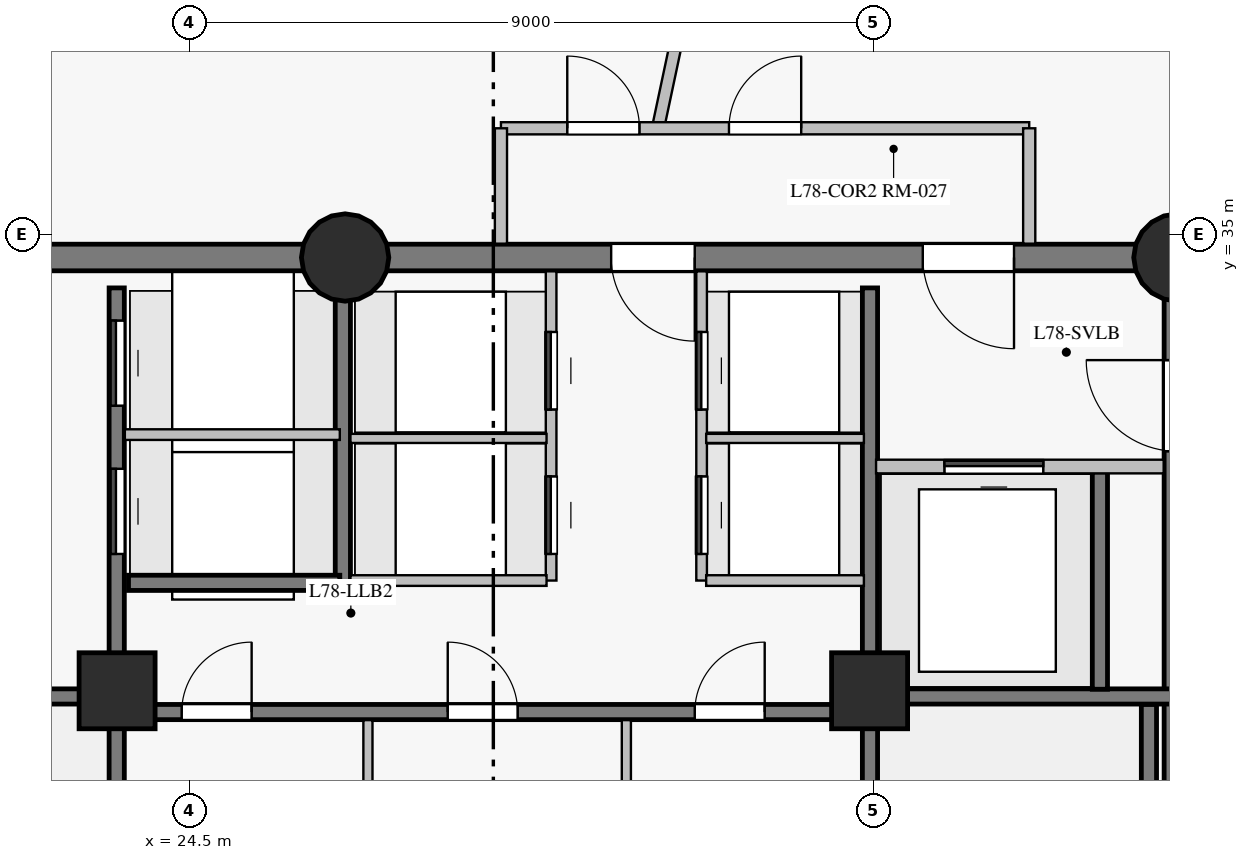
"""IFC4 building model, lengths in metres.
Left out: names, types, materials, properties, quantities, classifications, styles, units other than length and angle.
Written with IfcOpenShell. Run it as: python <this file> out.ifc"""

import sys

from ifc_helpers import new_model, si_unit, direction, frame, frame_2d, origin, origin_with_axes, origin_2d, place, context, subcontext, project, spatial, rectangle, circle, extrude, source, transform, mapped, element, fill, save


model = new_model("IFC4")
c1 = context("Model", 3, precision=1e-05, world=origin(), true_north=direction((0.0, 1.0)))
c2 = subcontext(c1, "Body", "Model", "MODEL_VIEW")
j1 = project(units=[si_unit("LENGTHUNIT", "METRE"), si_unit("PLANEANGLEUNIT", "RADIAN")], contexts=[c1])
p1 = place(None, origin())
s1 = spatial("IfcSite", under=j1, at=p1, CompositionType="ELEMENT")
p2 = place(p1, origin())
s2 = spatial("IfcBuilding", under=s1, at=p2, CompositionType="ELEMENT")
p3 = place(p2, frame((0.0, 0.0, 262.65)))
s3 = spatial("IfcBuildingStorey", under=s2, at=p3, CompositionType="ELEMENT", Elevation=262.65)
p4 = place(p3, frame((37.5, 18.3, 0.0), z_axis=(0.0, 0.0, 1.0), x_axis=(0.0, 1.0, 0.0)))
e1 = element("IfcWall", 1, at=p4, inside=s3, PredefinedType="SHEAR", context=c2, shape_type="SweptSolid", body=[
    extrude(rectangle(XDim=16.4, YDim=0.35, at=frame_2d((8.2, 0.0))), origin(), (0.0, 0.0, 1.0), 2.85),
])
p5 = place(p4, frame((13.85, 0.0, 0.0)))
e2 = element("IfcOpeningElement", 2, at=p5, cuts=e1, PredefinedType="OPENING", context=c2, shape_type="SweptSolid", body=[
    extrude(rectangle(XDim=1.2, YDim=2.15, at=frame_2d((0.6, 1.075))), frame((0.0, 0.185, 0.0), z_axis=(0.0, -1.0, 0.0), x_axis=(1.0, 0.0, 0.0)), (0.0, 0.0, 1.0), 0.37),
])
p6 = place(p3, frame((37.5, 34.7, 0.0), z_axis=(0.0, 0.0, 1.0), x_axis=(-1.0, 0.0, 0.0)))
e3 = element("IfcWall", 3, at=p6, inside=s3, PredefinedType="SHEAR", context=c2, shape_type="SweptSolid", body=[
    extrude(rectangle(XDim=10.95, YDim=0.35, at=frame_2d((5.475, 0.0))), origin(), (0.0, 0.0, 1.0), 2.85),
])
p7 = place(p6, frame((2.15, 0.0, 0.0)))
e4 = element("IfcOpeningElement", 4, at=p7, cuts=e3, PredefinedType="OPENING", context=c2, shape_type="SweptSolid", body=[
    extrude(rectangle(XDim=1.2, YDim=2.15, at=frame_2d((0.6, 1.075))), frame((0.0, 0.185, 0.0), z_axis=(0.0, -1.0, 0.0), x_axis=(1.0, 0.0, 0.0)), (0.0, 0.0, 1.0), 0.37),
])
p8 = place(p6, frame((6.35, 0.0, 0.0)))
e5 = element("IfcOpeningElement", 5, at=p8, cuts=e3, PredefinedType="OPENING", context=c2, shape_type="SweptSolid", body=[
    extrude(rectangle(XDim=1.1, YDim=2.15, at=frame_2d((0.55, 1.075))), frame((0.0, 0.185, 0.0), z_axis=(0.0, -1.0, 0.0), x_axis=(1.0, 0.0, 0.0)), (0.0, 0.0, 1.0), 0.37),
])
p9 = place(p3, frame((26.55, 34.7, 0.0), z_axis=(0.0, 0.0, 1.0), x_axis=(-1.0, 0.0, 0.0)))
e6 = element("IfcWall", 6, at=p9, inside=s3, PredefinedType="SHEAR", context=c2, shape_type="SweptSolid", body=[
    extrude(rectangle(XDim=7.05, YDim=0.35, at=frame_2d((3.525, 0.0))), origin(), (0.0, 0.0, 1.0), 2.85),
])
m1 = source(origin_with_axes(), c2, "Body", "SweptSolid", [
    extrude(circle(Radius=0.575, at=origin_2d()), origin(), (0.0, 0.0, 1.0), 3.05),
])
for number, where, z_axis, x_axis in (
    (7, (26.55, 34.7, 0.0), (0.0, 0.0, 1.0), (1.0, 0.0, 0.0)),
    (8, (37.5, 34.7, 0.0), (0.0, 0.0, 1.0), (1.0, 0.0, 0.0)),
):
    element("IfcColumn", number, at=place(p3, frame(where, z_axis=z_axis, x_axis=x_axis)), inside=s3, PredefinedType="COLUMN", context=c2, shape_type="MappedRepresentation", body=[
        mapped(m1, transform((0.0, 0.0, 0.0), scale=1.0)),
    ])
m2 = source(origin_with_axes(), c2, "Body", "SweptSolid", [
    extrude(rectangle(XDim=1.0, YDim=1.0, at=origin_2d()), origin(), (0.0, 0.0, 1.0), 3.05),
])
for number, where, z_axis, x_axis in (
    (9, (23.55, 29.0, 0.0), (0.0, 0.0, 1.0), (1.0, 0.0, 0.0)),
    (10, (33.45, 29.0, 0.0), (0.0, 0.0, 1.0), (1.0, 0.0, 0.0)),
):
    element("IfcColumn", number, at=place(p3, frame(where, z_axis=z_axis, x_axis=x_axis)), inside=s3, PredefinedType="COLUMN", context=c2, shape_type="MappedRepresentation", body=[
        mapped(m2, transform((0.0, 0.0, 0.0), scale=1.0)),
    ])
p10 = place(p3, frame((23.545, 18.7, 0.0), z_axis=(0.0, 0.0, 1.0), x_axis=(0.0, 1.0, 0.0)))
e11 = element("IfcWall", 11, at=p10, inside=s3, PredefinedType="SHEAR", context=c2, shape_type="SweptSolid", body=[
    extrude(rectangle(XDim=15.6, YDim=0.2, at=frame_2d((7.8, 0.0))), origin(), (0.0, 0.0, 1.0), 2.85),
])
p11 = place(p10, frame((2.75, 0.0, 0.0)))
e12 = element("IfcOpeningElement", 12, at=p11, cuts=e11, PredefinedType="OPENING", context=c2, shape_type="SweptSolid", body=[
    extrude(rectangle(XDim=1.15, YDim=2.15, at=frame_2d((0.575, 1.075))), frame((0.0, 0.11, 0.0), z_axis=(0.0, -1.0, 0.0), x_axis=(1.0, 0.0, 0.0)), (0.0, 0.0, 1.0), 0.22),
])
p12 = place(p10, frame((0.14, 0.0, 0.0)))
e13 = element("IfcOpeningElement", 13, at=p12, cuts=e11, PredefinedType="OPENING", context=c2, shape_type="SweptSolid", body=[
    extrude(rectangle(XDim=0.88, YDim=2.1, at=frame_2d((0.44, 1.05))), frame((0.0, 0.11, 0.0), z_axis=(0.0, -1.0, 0.0), x_axis=(1.0, 0.0, 0.0)), (0.0, 0.0, 1.0), 0.22),
])
p13 = place(p10, frame((1.36, 0.0, 0.0)))
e14 = element("IfcOpeningElement", 14, at=p13, cuts=e11, PredefinedType="OPENING", context=c2, shape_type="SweptSolid", body=[
    extrude(rectangle(XDim=0.88, YDim=2.1, at=frame_2d((0.44, 1.05))), frame((0.0, 0.11, 0.0), z_axis=(0.0, -1.0, 0.0), x_axis=(1.0, 0.0, 0.0)), (0.0, 0.0, 1.0), 0.22),
])
p14 = place(p10, frame((12.1, 0.0, 0.0)))
e15 = element("IfcOpeningElement", 15, at=p14, cuts=e11, PredefinedType="OPENING", context=c2, shape_type="SweptSolid", body=[
    extrude(rectangle(XDim=1.12, YDim=2.15, at=frame_2d((0.56, 1.075))), frame((0.0, 0.11, 0.0), z_axis=(0.0, -1.0, 0.0), x_axis=(1.0, 0.0, 0.0)), (0.0, 0.0, 1.0), 0.22),
])
p15 = place(p10, frame((14.05, 0.0, 0.0)))
e16 = element("IfcOpeningElement", 16, at=p15, cuts=e11, PredefinedType="OPENING", context=c2, shape_type="SweptSolid", body=[
    extrude(rectangle(XDim=1.12, YDim=2.15, at=frame_2d((0.56, 1.075))), frame((0.0, 0.11, 0.0), z_axis=(0.0, -1.0, 0.0), x_axis=(1.0, 0.0, 0.0)), (0.0, 0.0, 1.0), 0.22),
])
p16 = place(p3, frame((33.455, 18.7, 0.0), z_axis=(0.0, 0.0, 1.0), x_axis=(0.0, 1.0, 0.0)))
e17 = element("IfcWall", 17, at=p16, inside=s3, PredefinedType="SHEAR", context=c2, shape_type="SweptSolid", body=[
    extrude(rectangle(XDim=15.6, YDim=0.2, at=frame_2d((7.8, 0.0))), origin(), (0.0, 0.0, 1.0), 2.85),
])
p17 = place(p16, frame((2.75, 0.0, 0.0)))
e18 = element("IfcOpeningElement", 18, at=p17, cuts=e17, PredefinedType="OPENING", context=c2, shape_type="SweptSolid", body=[
    extrude(rectangle(XDim=1.15, YDim=2.15, at=frame_2d((0.575, 1.075))), frame((0.0, 0.11, 0.0), z_axis=(0.0, -1.0, 0.0), x_axis=(1.0, 0.0, 0.0)), (0.0, 0.0, 1.0), 0.22),
])
p18 = place(p16, frame((0.55, 0.0, 0.0)))
e19 = element("IfcOpeningElement", 19, at=p18, cuts=e17, PredefinedType="OPENING", context=c2, shape_type="SweptSolid", body=[
    extrude(rectangle(XDim=0.94, YDim=2.1, at=frame_2d((0.47, 1.05))), frame((0.0, 0.11, 0.0), z_axis=(0.0, -1.0, 0.0), x_axis=(1.0, 0.0, 0.0)), (0.0, 0.0, 1.0), 0.22),
])
p19 = place(p3, frame((23.7, 28.72, 0.0), z_axis=(0.0, 0.0, 1.0), x_axis=(1.0, 0.0, 0.0)))
e20 = element("IfcWall", 20, at=p19, inside=s3, PredefinedType="SHEAR", context=c2, shape_type="SweptSolid", body=[
    extrude(rectangle(XDim=9.6, YDim=0.2, at=frame_2d((4.8, 0.0))), origin(), (0.0, 0.0, 1.0), 2.85),
])
p20 = place(p19, frame((0.7, 0.0, 0.0)))
e21 = element("IfcOpeningElement", 21, at=p20, cuts=e20, PredefinedType="OPENING", context=c2, shape_type="SweptSolid", body=[
    extrude(rectangle(XDim=0.92, YDim=2.1, at=frame_2d((0.46, 1.05))), frame((0.0, 0.11, 0.0), z_axis=(0.0, -1.0, 0.0), x_axis=(1.0, 0.0, 0.0)), (0.0, 0.0, 1.0), 0.22),
])
p21 = place(p19, frame((4.2, 0.0, 0.0)))
e22 = element("IfcOpeningElement", 22, at=p21, cuts=e20, PredefinedType="OPENING", context=c2, shape_type="SweptSolid", body=[
    extrude(rectangle(XDim=0.92, YDim=2.1, at=frame_2d((0.46, 1.05))), frame((0.0, 0.11, 0.0), z_axis=(0.0, -1.0, 0.0), x_axis=(1.0, 0.0, 0.0)), (0.0, 0.0, 1.0), 0.22),
])
p22 = place(p19, frame((7.45, 0.0, 0.0)))
e23 = element("IfcOpeningElement", 23, at=p22, cuts=e20, PredefinedType="OPENING", context=c2, shape_type="SweptSolid", body=[
    extrude(rectangle(XDim=0.92, YDim=2.1, at=frame_2d((0.46, 1.05))), frame((0.0, 0.11, 0.0), z_axis=(0.0, -1.0, 0.0), x_axis=(1.0, 0.0, 0.0)), (0.0, 0.0, 1.0), 0.22),
])
p23 = place(p3, frame((37.125, 21.32, 0.0), z_axis=(0.0, 0.0, 1.0), x_axis=(0.0, 1.0, 0.0)))
e24 = element("IfcWall", 24, at=p23, inside=s3, PredefinedType="SHEAR", context=c2, shape_type="SweptSolid", body=[
    extrude(rectangle(XDim=7.5, YDim=0.2, at=frame_2d((3.75, 0.0))), origin(), (0.0, 0.0, 1.0), 2.85),
])
for number, where, z_axis, x_axis in (
    (25, (33.455, 28.925, 0.0), (0.0, 0.0, 1.0), (1.0, 0.0, 0.0)),
    (26, (19.55, 28.925, 0.0), (0.0, 0.0, 1.0), (1.0, 0.0, 0.0)),
):
    element("IfcWall", number, at=place(p3, frame(where, z_axis=z_axis, x_axis=x_axis)), inside=s3, PredefinedType="SHEAR", context=c2, shape_type="SweptSolid", body=[
        extrude(rectangle(XDim=3.995, YDim=0.2, at=frame_2d((1.998, 0.0))), origin(), (0.0, 0.0, 1.0), 2.85),
    ])
p24 = place(p3, frame((26.52, 30.42, 0.0), z_axis=(0.0, 0.0, 1.0), x_axis=(0.0, 1.0, 0.0)))
e27 = element("IfcWall", 27, at=p24, inside=s3, PredefinedType="SHEAR", context=c2, shape_type="SweptSolid", body=[
    extrude(rectangle(XDim=3.86, YDim=0.2, at=frame_2d((1.93, 0.0))), origin(), (0.0, 0.0, 1.0), 2.85),
])
p25 = place(p3, frame((36.48, 29.02, 0.0), z_axis=(0.0, 0.0, 1.0), x_axis=(0.0, 1.0, 0.0)))
e28 = element("IfcWall", 28, at=p25, inside=s3, PredefinedType="SHEAR", context=c2, shape_type="SweptSolid", body=[
    extrude(rectangle(XDim=2.86, YDim=0.2, at=frame_2d((1.43, 0.0))), origin(), (0.0, 0.0, 1.0), 2.85),
])
p26 = place(p3, frame((23.7, 30.42, 0.0), z_axis=(0.0, 0.0, 1.0), x_axis=(1.0, 0.0, 0.0)))
e29 = element("IfcWall", 29, at=p26, inside=s3, PredefinedType="SHEAR", context=c2, shape_type="SweptSolid", body=[
    extrude(rectangle(XDim=2.78, YDim=0.2, at=frame_2d((1.39, 0.0))), origin(), (0.0, 0.0, 1.0), 2.85),
])
p27 = place(p3, frame((30.659, 36.371, 0.0), z_axis=(0.0, 0.0, 1.0), x_axis=(0.207901866493, 0.978149688907, 0.0)))
e30 = element("IfcWall", 30, at=p27, inside=s3, PredefinedType="PARTITIONING", context=c2, shape_type="SweptSolid", body=[
    extrude(rectangle(XDim=9.008, YDim=0.16, at=frame_2d((4.504, 0.0))), origin(), (0.0, 0.0, 1.0), 2.85),
])
p28 = place(p3, frame((28.6, 36.4, 0.0), z_axis=(0.0, 0.0, 1.0), x_axis=(1.0, 0.0, 0.0)))
e31 = element("IfcWall", 31, at=p28, inside=s3, PredefinedType="PARTITIONING", context=c2, shape_type="SweptSolid", body=[
    extrude(rectangle(XDim=6.95, YDim=0.16, at=frame_2d((3.475, 0.0))), origin(), (0.0, 0.0, 1.0), 2.45),
])
p29 = place(p28, frame((3.0, 0.0, 0.0)))
e32 = element("IfcOpeningElement", 32, at=p29, cuts=e31, PredefinedType="OPENING", context=c2, shape_type="SweptSolid", body=[
    extrude(rectangle(XDim=0.95, YDim=2.15, at=frame_2d((0.475, 1.075))), frame((0.0, 0.09, 0.0), z_axis=(0.0, -1.0, 0.0), x_axis=(1.0, 0.0, 0.0)), (0.0, 0.0, 1.0), 0.18),
])
p30 = place(p28, frame((0.873, 0.0, 0.0)))
e33 = element("IfcOpeningElement", 33, at=p30, cuts=e31, PredefinedType="OPENING", context=c2, shape_type="SweptSolid", body=[
    extrude(rectangle(XDim=0.95, YDim=2.15, at=frame_2d((0.475, 1.075))), frame((0.0, 0.09, 0.0), z_axis=(0.0, -1.0, 0.0), x_axis=(1.0, 0.0, 0.0)), (0.0, 0.0, 1.0), 0.18),
])
p31 = place(p3, frame((29.26, 30.45, 0.0), z_axis=(0.0, 0.0, 1.0), x_axis=(0.0, 1.0, 0.0)))
e34 = element("IfcWall", 34, at=p31, inside=s3, PredefinedType="PARTITIONING", context=c2, shape_type="SweptSolid", body=[
    extrude(rectangle(XDim=4.068, YDim=0.14, at=frame_2d((2.034, 0.0))), origin(), (0.0, 0.0, 1.0), 2.85),
])
p32 = place(p31, frame((0.35, 0.0, 0.0)))
e35 = element("IfcOpeningElement", 35, at=p32, cuts=e34, PredefinedType="OPENING", context=c2, shape_type="SweptSolid", body=[
    extrude(rectangle(XDim=1.02, YDim=2.15, at=frame_2d((0.51, 1.075))), frame((0.0, 0.08, 0.0), z_axis=(0.0, -1.0, 0.0), x_axis=(1.0, 0.0, 0.0)), (0.0, 0.0, 1.0), 0.16),
])
p33 = place(p31, frame((2.25, 0.0, 0.0)))
e36 = element("IfcOpeningElement", 36, at=p33, cuts=e34, PredefinedType="OPENING", context=c2, shape_type="SweptSolid", body=[
    extrude(rectangle(XDim=1.02, YDim=2.15, at=frame_2d((0.51, 1.075))), frame((0.0, 0.08, 0.0), z_axis=(0.0, -1.0, 0.0), x_axis=(1.0, 0.0, 0.0)), (0.0, 0.0, 1.0), 0.16),
])
p34 = place(p3, frame((31.24, 30.45, 0.0), z_axis=(0.0, 0.0, 1.0), x_axis=(0.0, 1.0, 0.0)))
e37 = element("IfcWall", 37, at=p34, inside=s3, PredefinedType="PARTITIONING", context=c2, shape_type="SweptSolid", body=[
    extrude(rectangle(XDim=4.068, YDim=0.14, at=frame_2d((2.034, 0.0))), origin(), (0.0, 0.0, 1.0), 2.85),
])
p35 = place(p34, frame((0.35, 0.0, 0.0)))
e38 = element("IfcOpeningElement", 38, at=p35, cuts=e37, PredefinedType="OPENING", context=c2, shape_type="SweptSolid", body=[
    extrude(rectangle(XDim=1.02, YDim=2.15, at=frame_2d((0.51, 1.075))), frame((0.0, 0.08, 0.0), z_axis=(0.0, -1.0, 0.0), x_axis=(1.0, 0.0, 0.0)), (0.0, 0.0, 1.0), 0.16),
])
p36 = place(p34, frame((2.25, 0.0, 0.0)))
e39 = element("IfcOpeningElement", 39, at=p36, cuts=e37, PredefinedType="OPENING", context=c2, shape_type="SweptSolid", body=[
    extrude(rectangle(XDim=1.02, YDim=2.15, at=frame_2d((0.51, 1.075))), frame((0.0, 0.08, 0.0), z_axis=(0.0, -1.0, 0.0), x_axis=(1.0, 0.0, 0.0)), (0.0, 0.0, 1.0), 0.16),
])
p37 = place(p3, frame((33.535, 31.95, 0.0), z_axis=(0.0, 0.0, 1.0), x_axis=(1.0, 0.0, 0.0)))
e40 = element("IfcWall", 40, at=p37, inside=s3, PredefinedType="PARTITIONING", context=c2, shape_type="SweptSolid", body=[
    extrude(rectangle(XDim=3.784, YDim=0.18, at=frame_2d((1.892, 0.0))), origin(), (0.0, 0.0, 1.0), 2.85),
])
p38 = place(p37, frame((0.9, 0.0, 0.0)))
e41 = element("IfcOpeningElement", 41, at=p38, cuts=e40, PredefinedType="OPENING", context=c2, shape_type="SweptSolid", body=[
    extrude(rectangle(XDim=1.3, YDim=2.2, at=frame_2d((0.65, 1.1))), frame((0.0, 0.1, 0.0), z_axis=(0.0, -1.0, 0.0), x_axis=(1.0, 0.0, 0.0)), (0.0, 0.0, 1.0), 0.2),
])
p39 = place(p3, frame((23.652, 32.37, 0.0), z_axis=(0.0, 0.0, 1.0), x_axis=(1.0, 0.0, 0.0)))
e42 = element("IfcWall", 42, at=p39, inside=s3, PredefinedType="PARTITIONING", context=c2, shape_type="SweptSolid", body=[
    extrude(rectangle(XDim=2.828, YDim=0.14, at=frame_2d((1.414, 0.0))), origin(), (0.0, 0.0, 1.0), 2.85),
])
p40 = place(p3, frame((26.62, 30.45, 0.0), z_axis=(0.0, 0.0, 1.0), x_axis=(1.0, 0.0, 0.0)))
e43 = element("IfcWall", 43, at=p40, inside=s3, PredefinedType="PARTITIONING", context=c2, shape_type="SweptSolid", body=[
    extrude(rectangle(XDim=2.58, YDim=0.14, at=frame_2d((1.29, 0.0))), origin(), (0.0, 0.0, 1.0), 2.85),
])
p41 = place(p3, frame((26.62, 32.32, 0.0), z_axis=(0.0, 0.0, 1.0), x_axis=(1.0, 0.0, 0.0)))
e44 = element("IfcWall", 44, at=p41, inside=s3, PredefinedType="PARTITIONING", context=c2, shape_type="SweptSolid", body=[
    extrude(rectangle(XDim=2.58, YDim=0.12, at=frame_2d((1.29, 0.0))), origin(), (0.0, 0.0, 1.0), 2.85),
])
for number, where, z_axis, x_axis in (
    (45, (26.85, 26.027, 0.0), (0.0, 0.0, 1.0), (0.0, 1.0, 0.0)),
    (46, (30.25, 26.027, 0.0), (0.0, 0.0, 1.0), (0.0, 1.0, 0.0)),
):
    element("IfcWall", number, at=place(p3, frame(where, z_axis=z_axis, x_axis=x_axis)), inside=s3, PredefinedType="PARTITIONING", context=c2, shape_type="SweptSolid", body=[
        extrude(rectangle(XDim=2.587, YDim=0.12, at=frame_2d((1.293, 0.0))), origin(), (0.0, 0.0, 1.0), 2.85),
    ])
p42 = place(p3, frame((31.3, 30.45, 0.0), z_axis=(0.0, 0.0, 1.0), x_axis=(1.0, 0.0, 0.0)))
e47 = element("IfcWall", 47, at=p42, inside=s3, PredefinedType="PARTITIONING", context=c2, shape_type="SweptSolid", body=[
    extrude(rectangle(XDim=2.075, YDim=0.14, at=frame_2d((1.038, 0.0))), origin(), (0.0, 0.0, 1.0), 2.85),
])
p43 = place(p3, frame((31.3, 32.32, 0.0), z_axis=(0.0, 0.0, 1.0), x_axis=(1.0, 0.0, 0.0)))
e48 = element("IfcWall", 48, at=p43, inside=s3, PredefinedType="PARTITIONING", context=c2, shape_type="SweptSolid", body=[
    extrude(rectangle(XDim=2.075, YDim=0.12, at=frame_2d((1.038, 0.0))), origin(), (0.0, 0.0, 1.0), 2.85),
])
for number, where, z_axis, x_axis in (
    (49, (28.6, 34.882, 0.0), (0.0, 0.0, 1.0), (0.0, 1.0, 0.0)),
    (50, (35.55, 36.4, 0.0), (0.0, 0.0, 1.0), (0.0, -1.0, 0.0)),
):
    element("IfcWall", number, at=place(p3, frame(where, z_axis=z_axis, x_axis=x_axis)), inside=s3, PredefinedType="PARTITIONING", context=c2, shape_type="SweptSolid", body=[
        extrude(rectangle(XDim=1.518, YDim=0.16, at=frame_2d((0.759, 0.0))), origin(), (0.0, 0.0, 1.0), 2.85),
    ])
m3 = source(origin_with_axes(), c2, "Body", "SweptSolid", [
    extrude(rectangle(XDim=1.2, YDim=2.15, at=frame_2d((0.6, 1.075))), frame((0.0, 0.025, 0.0), z_axis=(0.0, -1.0, 0.0), x_axis=(1.0, 0.0, 0.0)), (0.0, 0.0, 1.0), 0.05),
])
p44 = place(p7, origin())
e51 = element("IfcDoor", 51, at=p44, inside=s3, OperationType="SINGLE_SWING_LEFT", PredefinedType="DOOR", context=c2, shape_type="MappedRepresentation", body=[
    mapped(m3, transform((0.0, 0.0, 0.0), scale=1.0)),
])
fill(e4, e51)
m4 = source(origin_with_axes(), c2, "Body", "SweptSolid", [
    extrude(rectangle(XDim=1.3, YDim=2.2, at=frame_2d((0.65, 1.1))), frame((0.0, 0.025, 0.0), z_axis=(0.0, -1.0, 0.0), x_axis=(1.0, 0.0, 0.0)), (0.0, 0.0, 1.0), 0.05),
])
p45 = place(p38, origin())
e52 = element("IfcDoor", 52, at=p45, inside=s3, OperationType="SLIDING_TO_LEFT", PredefinedType="DOOR", context=c2, shape_type="MappedRepresentation", body=[
    mapped(m4, transform((0.0, 0.0, 0.0), scale=1.0)),
])
fill(e41, e52)
m5 = source(origin_with_axes(), c2, "Body", "SweptSolid", [
    extrude(rectangle(XDim=0.92, YDim=2.1, at=frame_2d((0.46, 1.05))), frame((0.0, 0.025, 0.0), z_axis=(0.0, -1.0, 0.0), x_axis=(1.0, 0.0, 0.0)), (0.0, 0.0, 1.0), 0.05),
])
p46 = place(p20, origin())
e53 = element("IfcDoor", 53, at=p46, inside=s3, OperationType="SINGLE_SWING_RIGHT", PredefinedType="DOOR", context=c2, shape_type="MappedRepresentation", body=[
    mapped(m5, transform((0.0, 0.0, 0.0), scale=1.0)),
])
fill(e21, e53)
p47 = place(p21, origin())
e54 = element("IfcDoor", 54, at=p47, inside=s3, OperationType="SINGLE_SWING_LEFT", PredefinedType="DOOR", context=c2, shape_type="MappedRepresentation", body=[
    mapped(m5, transform((0.0, 0.0, 0.0), scale=1.0)),
])
fill(e22, e54)
p48 = place(p22, origin())
e55 = element("IfcDoor", 55, at=p48, inside=s3, OperationType="SINGLE_SWING_RIGHT", PredefinedType="DOOR", context=c2, shape_type="MappedRepresentation", body=[
    mapped(m5, transform((0.0, 0.0, 0.0), scale=1.0)),
])
fill(e23, e55)
m6 = source(origin_with_axes(), c2, "Body", "SweptSolid", [
    extrude(rectangle(XDim=1.1, YDim=2.15, at=frame_2d((0.55, 1.075))), frame((0.0, 0.025, 0.0), z_axis=(0.0, -1.0, 0.0), x_axis=(1.0, 0.0, 0.0)), (0.0, 0.0, 1.0), 0.05),
])
p49 = place(p8, origin())
e56 = element("IfcDoor", 56, at=p49, inside=s3, OperationType="SINGLE_SWING_LEFT", PredefinedType="DOOR", context=c2, shape_type="MappedRepresentation", body=[
    mapped(m6, transform((0.0, 0.0, 0.0), scale=1.0)),
])
fill(e5, e56)
m7 = source(origin_with_axes(), c2, "Body", "SweptSolid", [
    extrude(rectangle(XDim=1.12, YDim=2.15, at=frame_2d((0.56, 1.075))), frame((0.0, 0.025, 0.0), z_axis=(0.0, -1.0, 0.0), x_axis=(1.0, 0.0, 0.0)), (0.0, 0.0, 1.0), 0.05),
])
p50 = place(p14, origin())
e57 = element("IfcDoor", 57, at=p50, inside=s3, OperationType="SLIDING_TO_LEFT", PredefinedType="DOOR", context=c2, shape_type="MappedRepresentation", body=[
    mapped(m7, transform((0.0, 0.0, 0.0), scale=1.0)),
])
fill(e15, e57)
p51 = place(p15, origin())
e58 = element("IfcDoor", 58, at=p51, inside=s3, OperationType="SLIDING_TO_RIGHT", PredefinedType="DOOR", context=c2, shape_type="MappedRepresentation", body=[
    mapped(m7, transform((0.0, 0.0, 0.0), scale=1.0)),
])
fill(e16, e58)
m8 = source(origin_with_axes(), c2, "Body", "SweptSolid", [
    extrude(rectangle(XDim=1.02, YDim=2.15, at=frame_2d((0.51, 1.075))), frame((0.0, 0.025, 0.0), z_axis=(0.0, -1.0, 0.0), x_axis=(1.0, 0.0, 0.0)), (0.0, 0.0, 1.0), 0.05),
])
p52 = place(p32, origin())
e59 = element("IfcDoor", 59, at=p52, inside=s3, OperationType="SLIDING_TO_LEFT", PredefinedType="DOOR", context=c2, shape_type="MappedRepresentation", body=[
    mapped(m8, transform((0.0, 0.0, 0.0), scale=1.0)),
])
fill(e35, e59)
p53 = place(p33, origin())
e60 = element("IfcDoor", 60, at=p53, inside=s3, OperationType="SLIDING_TO_LEFT", PredefinedType="DOOR", context=c2, shape_type="MappedRepresentation", body=[
    mapped(m8, transform((0.0, 0.0, 0.0), scale=1.0)),
])
fill(e36, e60)
p54 = place(p35, origin())
e61 = element("IfcDoor", 61, at=p54, inside=s3, OperationType="SLIDING_TO_LEFT", PredefinedType="DOOR", context=c2, shape_type="MappedRepresentation", body=[
    mapped(m8, transform((0.0, 0.0, 0.0), scale=1.0)),
])
fill(e38, e61)
p55 = place(p36, origin())
e62 = element("IfcDoor", 62, at=p55, inside=s3, OperationType="SLIDING_TO_LEFT", PredefinedType="DOOR", context=c2, shape_type="MappedRepresentation", body=[
    mapped(m8, transform((0.0, 0.0, 0.0), scale=1.0)),
])
fill(e39, e62)
m9 = source(origin_with_axes(), c2, "Body", "SweptSolid", [
    extrude(rectangle(XDim=0.95, YDim=2.15, at=frame_2d((0.475, 1.075))), frame((0.0, 0.025, 0.0), z_axis=(0.0, -1.0, 0.0), x_axis=(1.0, 0.0, 0.0)), (0.0, 0.0, 1.0), 0.05),
])
p56 = place(p29, origin())
e63 = element("IfcDoor", 63, at=p56, inside=s3, OperationType="SINGLE_SWING_RIGHT", PredefinedType="DOOR", context=c2, shape_type="MappedRepresentation", body=[
    mapped(m9, transform((0.0, 0.0, 0.0), scale=1.0)),
])
fill(e32, e63)
p57 = place(p30, origin())
e64 = element("IfcDoor", 64, at=p57, inside=s3, OperationType="SINGLE_SWING_LEFT", PredefinedType="DOOR", context=c2, shape_type="MappedRepresentation", body=[
    mapped(m9, transform((0.0, 0.0, 0.0), scale=1.0)),
])
fill(e33, e64)
save(model, sys.argv[1])
